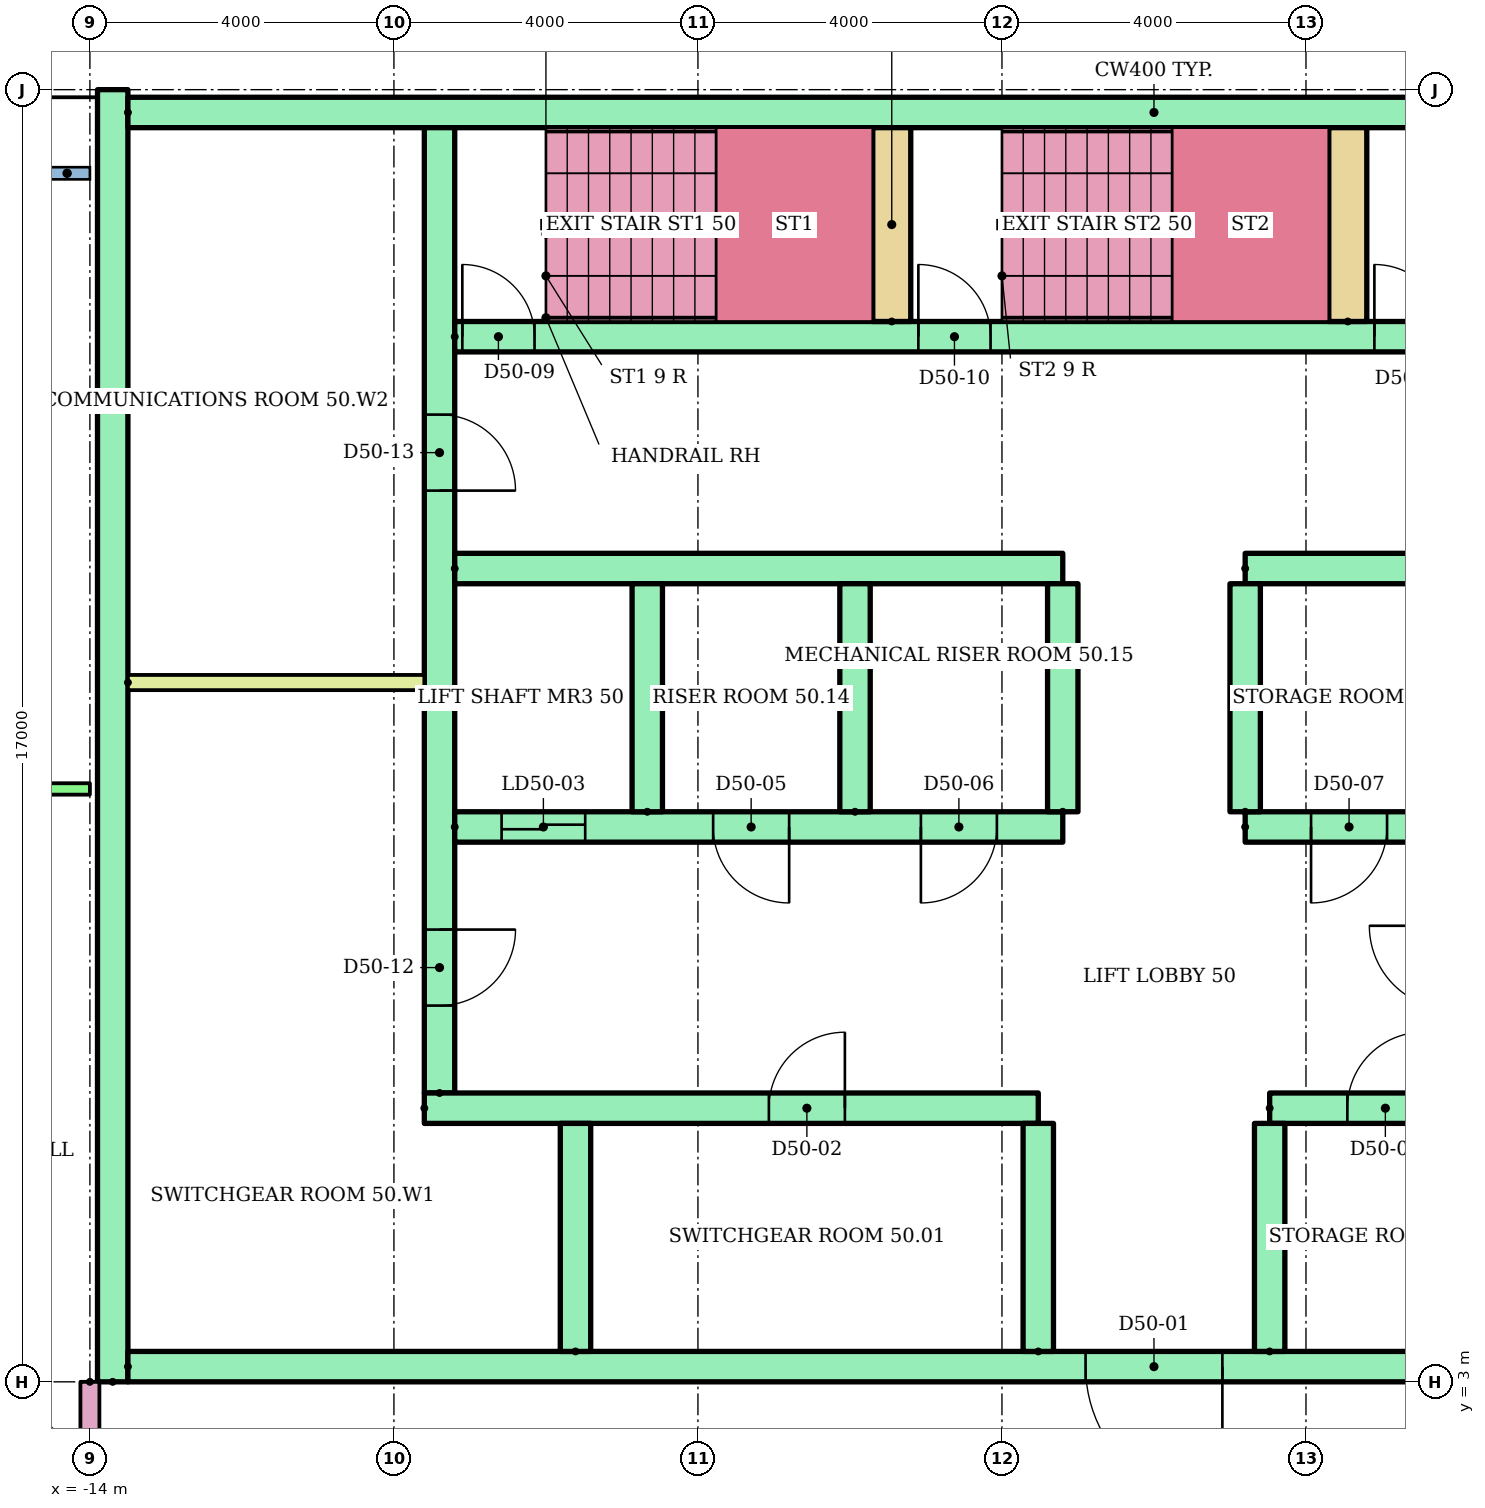
"""IFC4 building model, lengths in metres.
Left out: names, types, materials, properties, quantities, classifications, styles, units other than length and angle.
Written with IfcOpenShell. Run it as: python <this file> out.ifc"""

import sys

from ifc_helpers import new_model, si_unit, direction, frame, frame_2d, origin, place, context, subcontext, project, spatial, rectangle, extrude, element, fill, save


model = new_model("IFC4")
c1 = context("Model", 3, precision=1e-05, world=origin(), true_north=direction((0.0, 1.0)))
c2 = subcontext(c1, "Body", "Model", "MODEL_VIEW")
j1 = project(units=[si_unit("LENGTHUNIT", "METRE"), si_unit("PLANEANGLEUNIT", "RADIAN")], contexts=[c1])
p1 = place(None, origin())
s1 = spatial("IfcSite", under=j1, at=p1, CompositionType="ELEMENT")
p2 = place(p1, origin())
s2 = spatial("IfcBuilding", under=s1, at=p2, CompositionType="ELEMENT")
p3 = place(p2, frame((0.0, 0.0, 190.9)))
s3 = spatial("IfcBuildingStorey", under=s2, at=p3, CompositionType="ELEMENT", Elevation=190.9)
p4 = place(p3, frame((-13.7, 3.0, 0.0), z_axis=(0.0, 0.0, 1.0), x_axis=(0.0, 1.0, 0.0)))
e1 = element("IfcWall", 1, at=p4, inside=s3, PredefinedType="SHEAR", context=c2, shape_type="SweptSolid", body=[
    extrude(rectangle(XDim=17.0, YDim=0.4, at=frame_2d((8.5, 0.0))), origin(), (0.0, 0.0, 1.0), 2.8),
])
p5 = place(p3, frame((-13.5, 19.7, 0.0)))
e2 = element("IfcWall", 2, at=p5, inside=s3, PredefinedType="SHEAR", context=c2, shape_type="SweptSolid", body=[
    extrude(rectangle(XDim=27.0, YDim=0.4, at=frame_2d((13.5, 0.0))), origin(), (0.0, 0.0, 1.0), 2.8),
])
p6 = place(p3, frame((-9.4, 6.8, 0.0), z_axis=(0.0, 0.0, 1.0), x_axis=(0.0, 1.0, 0.0)))
e3 = element("IfcWall", 3, at=p6, inside=s3, PredefinedType="SHEAR", context=c2, shape_type="SweptSolid", body=[
    extrude(rectangle(XDim=12.7, YDim=0.4, at=frame_2d((6.35, 0.0))), origin(), (0.0, 0.0, 1.0), 2.8),
])
p7 = place(p6, frame((1.15, 0.0, 0.0)))
e4 = element("IfcOpeningElement", 4, at=p7, cuts=e3, PredefinedType="OPENING", context=c2, shape_type="SweptSolid", body=[
    extrude(rectangle(XDim=1.0, YDim=2.1, at=frame_2d((0.5, 1.05))), frame((0.0, 0.21, 0.0), z_axis=(0.0, -1.0, 0.0), x_axis=(1.0, 0.0, 0.0)), (0.0, 0.0, 1.0), 0.42),
])
p8 = place(p6, frame((7.925, 0.0, 0.0)))
e5 = element("IfcOpeningElement", 5, at=p8, cuts=e3, PredefinedType="OPENING", context=c2, shape_type="SweptSolid", body=[
    extrude(rectangle(XDim=1.0, YDim=2.1, at=frame_2d((0.5, 1.05))), frame((0.0, 0.21, 0.0), z_axis=(0.0, -1.0, 0.0), x_axis=(1.0, 0.0, 0.0)), (0.0, 0.0, 1.0), 0.42),
])
p9 = place(p3, frame((-13.5, 3.2, 0.0)))
e6 = element("IfcWall", 6, at=p9, inside=s3, PredefinedType="SHEAR", context=c2, shape_type="SweptSolid", body=[
    extrude(rectangle(XDim=27.0, YDim=0.4, at=frame_2d((13.5, 0.0))), origin(), (0.0, 0.0, 1.0), 2.8),
])
p10 = place(p9, frame((22.083, 0.0, 0.0)))
e7 = element("IfcOpeningElement", 7, at=p10, cuts=e6, PredefinedType="OPENING", context=c2, shape_type="SweptSolid", body=[
    extrude(rectangle(XDim=1.1, YDim=2.1, at=frame_2d((0.55, 1.05))), frame((0.0, 0.21, 0.0), z_axis=(0.0, -1.0, 0.0), x_axis=(1.0, 0.0, 0.0)), (0.0, 0.0, 1.0), 0.42),
])
p11 = place(p9, frame((25.128, 0.0, 0.0)))
e8 = element("IfcOpeningElement", 8, at=p11, cuts=e6, PredefinedType="OPENING", context=c2, shape_type="SweptSolid", body=[
    extrude(rectangle(XDim=1.1, YDim=2.1, at=frame_2d((0.55, 1.05))), frame((0.0, 0.21, 0.0), z_axis=(0.0, -1.0, 0.0), x_axis=(1.0, 0.0, 0.0)), (0.0, 0.0, 1.0), 0.42),
])
p12 = place(p9, frame((12.6, 0.0, 0.0)))
e9 = element("IfcOpeningElement", 9, at=p12, cuts=e6, PredefinedType="OPENING", context=c2, shape_type="SweptSolid", body=[
    extrude(rectangle(XDim=1.8, YDim=2.1, at=frame_2d((0.9, 1.05))), frame((0.0, 0.21, 0.0), z_axis=(0.0, -1.0, 0.0), x_axis=(1.0, 0.0, 0.0)), (0.0, 0.0, 1.0), 0.42),
])
p13 = place(p3, frame((-9.6, 6.6, 0.0)))
e10 = element("IfcWall", 10, at=p13, inside=s3, PredefinedType="SHEAR", context=c2, shape_type="SweptSolid", body=[
    extrude(rectangle(XDim=8.078, YDim=0.4, at=frame_2d((4.039, 0.0))), origin(), (0.0, 0.0, 1.0), 2.8),
])
p14 = place(p13, frame((4.533, 0.0, 0.0)))
e11 = element("IfcOpeningElement", 11, at=p14, cuts=e10, PredefinedType="OPENING", context=c2, shape_type="SweptSolid", body=[
    extrude(rectangle(XDim=1.0, YDim=2.1, at=frame_2d((0.5, 1.05))), frame((0.0, 0.21, 0.0), z_axis=(0.0, -1.0, 0.0), x_axis=(1.0, 0.0, 0.0)), (0.0, 0.0, 1.0), 0.42),
])
p15 = place(p3, frame((1.522, 6.6, 0.0)))
e12 = element("IfcWall", 12, at=p15, inside=s3, PredefinedType="SHEAR", context=c2, shape_type="SweptSolid", body=[
    extrude(rectangle(XDim=11.978, YDim=0.4, at=frame_2d((5.989, 0.0))), origin(), (0.0, 0.0, 1.0), 2.8),
])
p16 = place(p15, frame((1.022, 0.0, 0.0)))
e13 = element("IfcOpeningElement", 13, at=p16, cuts=e12, PredefinedType="OPENING", context=c2, shape_type="SweptSolid", body=[
    extrude(rectangle(XDim=1.0, YDim=2.1, at=frame_2d((0.5, 1.05))), frame((0.0, 0.21, 0.0), z_axis=(0.0, -1.0, 0.0), x_axis=(1.0, 0.0, 0.0)), (0.0, 0.0, 1.0), 0.42),
])
p17 = place(p15, frame((4.067, 0.0, 0.0)))
e14 = element("IfcOpeningElement", 14, at=p17, cuts=e12, PredefinedType="OPENING", context=c2, shape_type="SweptSolid", body=[
    extrude(rectangle(XDim=1.0, YDim=2.1, at=frame_2d((0.5, 1.05))), frame((0.0, 0.21, 0.0), z_axis=(0.0, -1.0, 0.0), x_axis=(1.0, 0.0, 0.0)), (0.0, 0.0, 1.0), 0.42),
])
for number, where, z_axis, x_axis in (
    (15, (-7.611, 3.4, 0.0), (0.0, 0.0, 1.0), (0.0, 1.0, 0.0)),
    (16, (-1.522, 3.4, 0.0), (0.0, 0.0, 1.0), (0.0, 1.0, 0.0)),
    (17, (1.522, 3.4, 0.0), (0.0, 0.0, 1.0), (0.0, 1.0, 0.0)),
):
    element("IfcWall", number, at=place(p3, frame(where, z_axis=z_axis, x_axis=x_axis)), inside=s3, PredefinedType="SHEAR", context=c2, shape_type="SweptSolid", body=[
        extrude(rectangle(XDim=3.0, YDim=0.4, at=frame_2d((1.5, 0.0))), origin(), (0.0, 0.0, 1.0), 2.8),
    ])
p18 = place(p3, frame((-9.2, 10.3, 0.0)))
e18 = element("IfcWall", 18, at=p18, inside=s3, PredefinedType="SHEAR", context=c2, shape_type="SweptSolid", body=[
    extrude(rectangle(XDim=8.0, YDim=0.4, at=frame_2d((4.0, 0.0))), origin(), (0.0, 0.0, 1.0), 2.8),
])
p19 = place(p18, frame((0.617, 0.0, 0.0)))
e19 = element("IfcOpeningElement", 19, at=p19, cuts=e18, PredefinedType="OPENING", context=c2, shape_type="SweptSolid", body=[
    extrude(rectangle(XDim=1.1, YDim=2.1, at=frame_2d((0.55, 1.05))), frame((0.0, 0.21, 0.0), z_axis=(0.0, -1.0, 0.0), x_axis=(1.0, 0.0, 0.0)), (0.0, 0.0, 1.0), 0.42),
])
p20 = place(p18, frame((3.4, 0.0, 0.0)))
e20 = element("IfcOpeningElement", 20, at=p20, cuts=e18, PredefinedType="OPENING", context=c2, shape_type="SweptSolid", body=[
    extrude(rectangle(XDim=1.0, YDim=2.1, at=frame_2d((0.5, 1.05))), frame((0.0, 0.21, 0.0), z_axis=(0.0, -1.0, 0.0), x_axis=(1.0, 0.0, 0.0)), (0.0, 0.0, 1.0), 0.42),
])
p21 = place(p18, frame((6.133, 0.0, 0.0)))
e21 = element("IfcOpeningElement", 21, at=p21, cuts=e18, PredefinedType="OPENING", context=c2, shape_type="SweptSolid", body=[
    extrude(rectangle(XDim=1.0, YDim=2.1, at=frame_2d((0.5, 1.05))), frame((0.0, 0.21, 0.0), z_axis=(0.0, -1.0, 0.0), x_axis=(1.0, 0.0, 0.0)), (0.0, 0.0, 1.0), 0.42),
])
p22 = place(p3, frame((-9.2, 13.7, 0.0)))
e22 = element("IfcWall", 22, at=p22, inside=s3, PredefinedType="SHEAR", context=c2, shape_type="SweptSolid", body=[
    extrude(rectangle(XDim=8.0, YDim=0.4, at=frame_2d((4.0, 0.0))), origin(), (0.0, 0.0, 1.0), 2.8),
])
p23 = place(p3, frame((1.2, 10.3, 0.0)))
e23 = element("IfcWall", 23, at=p23, inside=s3, PredefinedType="SHEAR", context=c2, shape_type="SweptSolid", body=[
    extrude(rectangle(XDim=8.0, YDim=0.4, at=frame_2d((4.0, 0.0))), origin(), (0.0, 0.0, 1.0), 2.8),
])
p24 = place(p23, frame((3.55, 0.0, 0.0)))
e24 = element("IfcOpeningElement", 24, at=p24, cuts=e23, PredefinedType="OPENING", context=c2, shape_type="SweptSolid", body=[
    extrude(rectangle(XDim=1.1, YDim=2.1, at=frame_2d((0.55, 1.05))), frame((0.0, 0.21, 0.0), z_axis=(0.0, -1.0, 0.0), x_axis=(1.0, 0.0, 0.0)), (0.0, 0.0, 1.0), 0.42),
])
p25 = place(p23, frame((6.283, 0.0, 0.0)))
e25 = element("IfcOpeningElement", 25, at=p25, cuts=e23, PredefinedType="OPENING", context=c2, shape_type="SweptSolid", body=[
    extrude(rectangle(XDim=1.1, YDim=2.1, at=frame_2d((0.55, 1.05))), frame((0.0, 0.21, 0.0), z_axis=(0.0, -1.0, 0.0), x_axis=(1.0, 0.0, 0.0)), (0.0, 0.0, 1.0), 0.42),
])
p26 = place(p23, frame((0.867, 0.0, 0.0)))
e26 = element("IfcOpeningElement", 26, at=p26, cuts=e23, PredefinedType="OPENING", context=c2, shape_type="SweptSolid", body=[
    extrude(rectangle(XDim=1.0, YDim=2.1, at=frame_2d((0.5, 1.05))), frame((0.0, 0.21, 0.0), z_axis=(0.0, -1.0, 0.0), x_axis=(1.0, 0.0, 0.0)), (0.0, 0.0, 1.0), 0.42),
])
p27 = place(p3, frame((1.2, 13.7, 0.0)))
e27 = element("IfcWall", 27, at=p27, inside=s3, PredefinedType="SHEAR", context=c2, shape_type="SweptSolid", body=[
    extrude(rectangle(XDim=8.0, YDim=0.4, at=frame_2d((4.0, 0.0))), origin(), (0.0, 0.0, 1.0), 2.8),
])
for number, where, z_axis, x_axis in (
    (28, (-6.667, 10.5, 0.0), (0.0, 0.0, 1.0), (0.0, 1.0, 0.0)),
    (29, (-3.933, 10.5, 0.0), (0.0, 0.0, 1.0), (0.0, 1.0, 0.0)),
    (30, (-1.2, 10.5, 0.0), (0.0, 0.0, 1.0), (0.0, 1.0, 0.0)),
    (31, (1.2, 10.5, 0.0), (0.0, 0.0, 1.0), (0.0, 1.0, 0.0)),
):
    element("IfcWall", number, at=place(p3, frame(where, z_axis=z_axis, x_axis=x_axis)), inside=s3, PredefinedType="SHEAR", context=c2, shape_type="SweptSolid", body=[
        extrude(rectangle(XDim=3.0, YDim=0.4, at=frame_2d((1.5, 0.0))), origin(), (0.0, 0.0, 1.0), 2.8),
    ])
p28 = place(p3, frame((-9.2, 16.75, 0.0)))
e32 = element("IfcWall", 32, at=p28, inside=s3, PredefinedType="SHEAR", context=c2, shape_type="SweptSolid", body=[
    extrude(rectangle(XDim=18.4, YDim=0.4, at=frame_2d((9.2, 0.0))), origin(), (0.0, 0.0, 1.0), 2.8),
])
p29 = place(p28, frame((0.1, 0.0, 0.0)))
e33 = element("IfcOpeningElement", 33, at=p29, cuts=e32, PredefinedType="OPENING", context=c2, shape_type="SweptSolid", body=[
    extrude(rectangle(XDim=0.95, YDim=2.1, at=frame_2d((0.475, 1.05))), frame((0.0, 0.21, 0.0), z_axis=(0.0, -1.0, 0.0), x_axis=(1.0, 0.0, 0.0)), (0.0, 0.0, 1.0), 0.42),
])
p30 = place(p28, frame((6.1, 0.0, 0.0)))
e34 = element("IfcOpeningElement", 34, at=p30, cuts=e32, PredefinedType="OPENING", context=c2, shape_type="SweptSolid", body=[
    extrude(rectangle(XDim=0.95, YDim=2.1, at=frame_2d((0.475, 1.05))), frame((0.0, 0.21, 0.0), z_axis=(0.0, -1.0, 0.0), x_axis=(1.0, 0.0, 0.0)), (0.0, 0.0, 1.0), 0.42),
])
p31 = place(p28, frame((12.1, 0.0, 0.0)))
e35 = element("IfcOpeningElement", 35, at=p31, cuts=e32, PredefinedType="OPENING", context=c2, shape_type="SweptSolid", body=[
    extrude(rectangle(XDim=0.95, YDim=2.1, at=frame_2d((0.475, 1.05))), frame((0.0, 0.21, 0.0), z_axis=(0.0, -1.0, 0.0), x_axis=(1.0, 0.0, 0.0)), (0.0, 0.0, 1.0), 0.42),
])
for number, where, z_axis, x_axis in (
    (36, (-3.45, 16.95, 0.0), (0.0, 0.0, 1.0), (0.0, 1.0, 0.0)),
    (37, (2.55, 16.95, 0.0), (0.0, 0.0, 1.0), (0.0, 1.0, 0.0)),
):
    element("IfcWall", number, at=place(p3, frame(where, z_axis=z_axis, x_axis=x_axis)), inside=s3, PredefinedType="SHEAR", context=c2, shape_type="SweptSolid", body=[
        extrude(rectangle(XDim=2.55, YDim=0.5, at=frame_2d((1.275, 0.0))), origin(), (0.0, 0.0, 1.0), 2.8),
    ])
p32 = place(p3, frame((-13.5, 12.2, 0.0)))
e38 = element("IfcWall", 38, at=p32, inside=s3, PredefinedType="PARTITIONING", context=c2, shape_type="SweptSolid", body=[
    extrude(rectangle(XDim=3.9, YDim=0.2, at=frame_2d((1.95, 0.0))), origin(), (0.0, 0.0, 1.0), 2.8),
])
p33 = place(p3, frame((-24.82, 10.8, 0.0)))
e39 = element("IfcWall", 39, at=p33, inside=s3, PredefinedType="PARTITIONING", context=c2, shape_type="SweptSolid", body=[
    extrude(rectangle(XDim=10.82, YDim=0.15, at=frame_2d((5.41, 0.0))), origin(), (0.0, 0.0, 1.0), 2.4),
])
p34 = place(p33, frame((1.273, 0.0, 0.0)))
e40 = element("IfcOpeningElement", 40, at=p34, cuts=e39, PredefinedType="OPENING", context=c2, shape_type="SweptSolid", body=[
    extrude(rectangle(XDim=1.0, YDim=2.1, at=frame_2d((0.5, 1.05))), frame((0.0, 0.085, 0.0), z_axis=(0.0, -1.0, 0.0), x_axis=(1.0, 0.0, 0.0)), (0.0, 0.0, 1.0), 0.17),
])
p35 = place(p33, frame((7.27, 0.0, 0.0)))
e41 = element("IfcOpeningElement", 41, at=p35, cuts=e39, PredefinedType="OPENING", context=c2, shape_type="SweptSolid", body=[
    extrude(rectangle(XDim=1.0, YDim=2.1, at=frame_2d((0.5, 1.05))), frame((0.0, 0.085, 0.0), z_axis=(0.0, -1.0, 0.0), x_axis=(1.0, 0.0, 0.0)), (0.0, 0.0, 1.0), 0.17),
])
p36 = place(p3, frame((-14.0, 3.0, 0.0), z_axis=(0.0, 0.0, 1.0), x_axis=(0.0, -1.0, 0.0)))
e42 = element("IfcWall", 42, at=p36, inside=s3, PredefinedType="PARTITIONING", context=c2, shape_type="SweptSolid", body=[
    extrude(rectangle(XDim=1.6, YDim=0.25, at=frame_2d((0.8, 0.0))), origin(), (0.0, 0.0, 1.0), 2.4),
])
p37 = place(p12, frame((1.8, 0.0, 0.0), z_axis=(0.0, 0.0, 1.0), x_axis=(-1.0, 0.0, 0.0)))
e43 = element("IfcDoor", 43, at=p37, inside=s3, OperationType="DOUBLE_DOOR_SINGLE_SWING", PredefinedType="DOOR", context=c2, shape_type="SweptSolid", body=[
    extrude(rectangle(XDim=1.8, YDim=2.1, at=frame_2d((0.9, 1.05))), frame((0.0, 0.025, 0.0), z_axis=(0.0, -1.0, 0.0), x_axis=(1.0, 0.0, 0.0)), (0.0, 0.0, 1.0), 0.05),
])
fill(e9, e43)
p38 = place(p14, origin())
e44 = element("IfcDoor", 44, at=p38, inside=s3, OperationType="SINGLE_SWING_RIGHT", PredefinedType="DOOR", context=c2, shape_type="SweptSolid", body=[
    extrude(rectangle(XDim=1.0, YDim=2.1, at=frame_2d((0.5, 1.05))), frame((0.0, 0.025, 0.0), z_axis=(0.0, -1.0, 0.0), x_axis=(1.0, 0.0, 0.0)), (0.0, 0.0, 1.0), 0.05),
])
fill(e11, e44)
p39 = place(p16, origin())
e45 = element("IfcDoor", 45, at=p39, inside=s3, OperationType="SINGLE_SWING_RIGHT", PredefinedType="DOOR", context=c2, shape_type="SweptSolid", body=[
    extrude(rectangle(XDim=1.0, YDim=2.1, at=frame_2d((0.5, 1.05))), frame((0.0, 0.025, 0.0), z_axis=(0.0, -1.0, 0.0), x_axis=(1.0, 0.0, 0.0)), (0.0, 0.0, 1.0), 0.05),
])
fill(e13, e45)
p40 = place(p19, origin())
e46 = element("IfcDoor", 46, at=p40, inside=s3, OperationType="SLIDING_TO_LEFT", PredefinedType="DOOR", context=c2, shape_type="SweptSolid", body=[
    extrude(rectangle(XDim=1.1, YDim=2.1, at=frame_2d((0.55, 1.05))), frame((0.0, 0.025, 0.0), z_axis=(0.0, -1.0, 0.0), x_axis=(1.0, 0.0, 0.0)), (0.0, 0.0, 1.0), 0.05),
])
fill(e19, e46)
p41 = place(p20, frame((1.0, 0.0, 0.0), z_axis=(0.0, 0.0, 1.0), x_axis=(-1.0, 0.0, 0.0)))
e47 = element("IfcDoor", 47, at=p41, inside=s3, OperationType="SINGLE_SWING_RIGHT", PredefinedType="DOOR", context=c2, shape_type="SweptSolid", body=[
    extrude(rectangle(XDim=1.0, YDim=2.1, at=frame_2d((0.5, 1.05))), frame((0.0, 0.025, 0.0), z_axis=(0.0, -1.0, 0.0), x_axis=(1.0, 0.0, 0.0)), (0.0, 0.0, 1.0), 0.05),
])
fill(e20, e47)
p42 = place(p21, frame((1.0, 0.0, 0.0), z_axis=(0.0, 0.0, 1.0), x_axis=(-1.0, 0.0, 0.0)))
e48 = element("IfcDoor", 48, at=p42, inside=s3, OperationType="SINGLE_SWING_LEFT", PredefinedType="DOOR", context=c2, shape_type="SweptSolid", body=[
    extrude(rectangle(XDim=1.0, YDim=2.1, at=frame_2d((0.5, 1.05))), frame((0.0, 0.025, 0.0), z_axis=(0.0, -1.0, 0.0), x_axis=(1.0, 0.0, 0.0)), (0.0, 0.0, 1.0), 0.05),
])
fill(e21, e48)
p43 = place(p26, frame((1.0, 0.0, 0.0), z_axis=(0.0, 0.0, 1.0), x_axis=(-1.0, 0.0, 0.0)))
e49 = element("IfcDoor", 49, at=p43, inside=s3, OperationType="SINGLE_SWING_LEFT", PredefinedType="DOOR", context=c2, shape_type="SweptSolid", body=[
    extrude(rectangle(XDim=1.0, YDim=2.1, at=frame_2d((0.5, 1.05))), frame((0.0, 0.025, 0.0), z_axis=(0.0, -1.0, 0.0), x_axis=(1.0, 0.0, 0.0)), (0.0, 0.0, 1.0), 0.05),
])
fill(e26, e49)
p44 = place(p29, origin())
e50 = element("IfcDoor", 50, at=p44, inside=s3, OperationType="SINGLE_SWING_LEFT", PredefinedType="DOOR", context=c2, shape_type="SweptSolid", body=[
    extrude(rectangle(XDim=0.95, YDim=2.1, at=frame_2d((0.475, 1.05))), frame((0.0, 0.025, 0.0), z_axis=(0.0, -1.0, 0.0), x_axis=(1.0, 0.0, 0.0)), (0.0, 0.0, 1.0), 0.05),
])
fill(e33, e50)
p45 = place(p30, origin())
e51 = element("IfcDoor", 51, at=p45, inside=s3, OperationType="SINGLE_SWING_LEFT", PredefinedType="DOOR", context=c2, shape_type="SweptSolid", body=[
    extrude(rectangle(XDim=0.95, YDim=2.1, at=frame_2d((0.475, 1.05))), frame((0.0, 0.025, 0.0), z_axis=(0.0, -1.0, 0.0), x_axis=(1.0, 0.0, 0.0)), (0.0, 0.0, 1.0), 0.05),
])
fill(e34, e51)
p46 = place(p31, origin())
e52 = element("IfcDoor", 52, at=p46, inside=s3, OperationType="SINGLE_SWING_LEFT", PredefinedType="DOOR", context=c2, shape_type="SweptSolid", body=[
    extrude(rectangle(XDim=0.95, YDim=2.1, at=frame_2d((0.475, 1.05))), frame((0.0, 0.025, 0.0), z_axis=(0.0, -1.0, 0.0), x_axis=(1.0, 0.0, 0.0)), (0.0, 0.0, 1.0), 0.05),
])
fill(e35, e52)
p47 = place(p7, frame((1.0, 0.0, 0.0), z_axis=(0.0, 0.0, 1.0), x_axis=(-1.0, 0.0, 0.0)))
e53 = element("IfcDoor", 53, at=p47, inside=s3, OperationType="SINGLE_SWING_RIGHT", PredefinedType="DOOR", context=c2, shape_type="SweptSolid", body=[
    extrude(rectangle(XDim=1.0, YDim=2.1, at=frame_2d((0.5, 1.05))), frame((0.0, 0.025, 0.0), z_axis=(0.0, -1.0, 0.0), x_axis=(1.0, 0.0, 0.0)), (0.0, 0.0, 1.0), 0.05),
])
fill(e4, e53)
p48 = place(p8, frame((1.0, 0.0, 0.0), z_axis=(0.0, 0.0, 1.0), x_axis=(-1.0, 0.0, 0.0)))
e54 = element("IfcDoor", 54, at=p48, inside=s3, OperationType="SINGLE_SWING_LEFT", PredefinedType="DOOR", context=c2, shape_type="SweptSolid", body=[
    extrude(rectangle(XDim=1.0, YDim=2.1, at=frame_2d((0.5, 1.05))), frame((0.0, 0.025, 0.0), z_axis=(0.0, -1.0, 0.0), x_axis=(1.0, 0.0, 0.0)), (0.0, 0.0, 1.0), 0.05),
])
fill(e5, e54)
save(model, sys.argv[1])
